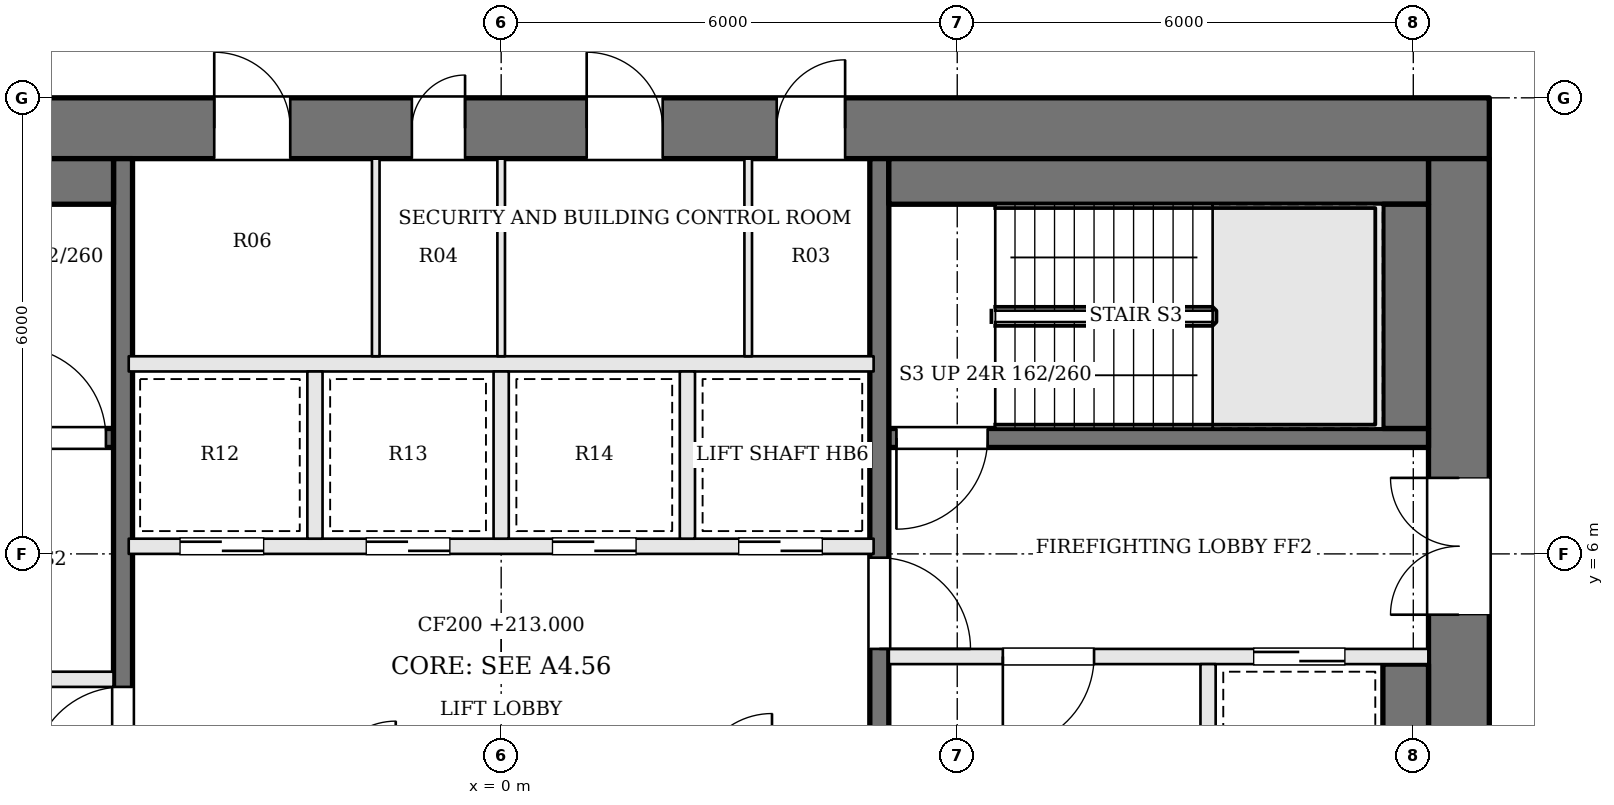
"""IFC4 building model, lengths in metres.
Left out: names, types, materials, properties, quantities, classifications, styles, units other than length and angle.
Written with IfcOpenShell. Run it as: python <this file> out.ifc"""

import sys

from ifc_helpers import new_model, si_unit, direction, frame, frame_2d, origin, place, context, subcontext, project, spatial, rectangle, extrude, element, fill, save


model = new_model("IFC4")
c1 = context("Model", 3, precision=1e-05, world=origin(), true_north=direction((0.0, 1.0)))
c2 = subcontext(c1, "Body", "Model", "MODEL_VIEW")
j1 = project(units=[si_unit("LENGTHUNIT", "METRE"), si_unit("PLANEANGLEUNIT", "RADIAN")], contexts=[c1])
p1 = place(None, origin())
s1 = spatial("IfcSite", under=j1, at=p1, CompositionType="ELEMENT")
p2 = place(p1, origin())
s2 = spatial("IfcBuilding", under=s1, at=p2, CompositionType="ELEMENT")
p3 = place(p2, frame((0.0, 0.0, 213.0)))
s3 = spatial("IfcBuildingStorey", under=s2, at=p3, CompositionType="ELEMENT", Elevation=213.0)
p4 = place(p3, frame((-13.0, 11.6, 0.0), z_axis=(0.0, 0.0, 1.0), x_axis=(1.0, 0.0, 0.0)))
e1 = element("IfcWall", 1, at=p4, inside=s3, PredefinedType="SHEAR", context=c2, shape_type="SweptSolid", body=[
    extrude(rectangle(XDim=26.0, YDim=0.8, at=frame_2d((13.0, 0.0))), origin(), (0.0, 0.0, 1.0), 3.9),
])
p5 = place(p4, frame((9.225, 0.0, 0.0)))
e2 = element("IfcOpeningElement", 2, at=p5, cuts=e1, PredefinedType="OPENING", context=c2, shape_type="SweptSolid", body=[
    extrude(rectangle(XDim=1.0, YDim=2.1, at=frame_2d((0.5, 1.05))), frame((0.0, 0.41, 0.0), z_axis=(0.0, -1.0, 0.0), x_axis=(1.0, 0.0, 0.0)), (0.0, 0.0, 1.0), 0.82),
])
p6 = place(p4, frame((11.825, 0.0, 0.0)))
e3 = element("IfcOpeningElement", 3, at=p6, cuts=e1, PredefinedType="OPENING", context=c2, shape_type="SweptSolid", body=[
    extrude(rectangle(XDim=0.7, YDim=2.1, at=frame_2d((0.35, 1.05))), frame((0.0, 0.41, 0.0), z_axis=(0.0, -1.0, 0.0), x_axis=(1.0, 0.0, 0.0)), (0.0, 0.0, 1.0), 0.82),
])
p7 = place(p4, frame((14.125, 0.0, 0.0)))
e4 = element("IfcOpeningElement", 4, at=p7, cuts=e1, PredefinedType="OPENING", context=c2, shape_type="SweptSolid", body=[
    extrude(rectangle(XDim=1.0, YDim=2.1, at=frame_2d((0.5, 1.05))), frame((0.0, 0.41, 0.0), z_axis=(0.0, -1.0, 0.0), x_axis=(1.0, 0.0, 0.0)), (0.0, 0.0, 1.0), 0.82),
])
p8 = place(p4, frame((16.625, 0.0, 0.0)))
e5 = element("IfcOpeningElement", 5, at=p8, cuts=e1, PredefinedType="OPENING", context=c2, shape_type="SweptSolid", body=[
    extrude(rectangle(XDim=0.9, YDim=2.1, at=frame_2d((0.45, 1.05))), frame((0.0, 0.41, 0.0), z_axis=(0.0, -1.0, 0.0), x_axis=(1.0, 0.0, 0.0)), (0.0, 0.0, 1.0), 0.82),
])
p9 = place(p3, frame((12.6, -2.2, 0.0), z_axis=(0.0, 0.0, 1.0), x_axis=(0.0, 1.0, 0.0)))
e6 = element("IfcWall", 6, at=p9, inside=s3, PredefinedType="SHEAR", context=c2, shape_type="SweptSolid", body=[
    extrude(rectangle(XDim=13.4, YDim=0.8, at=frame_2d((6.7, 0.0))), origin(), (0.0, 0.0, 1.0), 3.9),
])
p10 = place(p9, frame((7.4, 0.0, 0.0)))
e7 = element("IfcOpeningElement", 7, at=p10, cuts=e6, PredefinedType="OPENING", context=c2, shape_type="SweptSolid", body=[
    extrude(rectangle(XDim=1.8, YDim=2.1, at=frame_2d((0.9, 1.05))), frame((0.0, 0.41, 0.0), z_axis=(0.0, -1.0, 0.0), x_axis=(1.0, 0.0, 0.0)), (0.0, 0.0, 1.0), 0.82),
])
p11 = place(p3, frame((12.2, 7.525, 0.0), z_axis=(0.0, 0.0, 1.0), x_axis=(-1.0, 0.0, 0.0)))
e8 = element("IfcWall", 8, at=p11, inside=s3, PredefinedType="SOLIDWALL", context=c2, shape_type="SweptSolid", body=[
    extrude(rectangle(XDim=7.1, YDim=0.25, at=frame_2d((3.55, 0.0))), origin(), (0.0, 0.0, 1.0), 3.6),
])
p12 = place(p11, frame((5.8, 0.0, 0.0)))
e9 = element("IfcOpeningElement", 9, at=p12, cuts=e8, PredefinedType="OPENING", context=c2, shape_type="SweptSolid", body=[
    extrude(rectangle(XDim=1.2, YDim=2.1, at=frame_2d((0.6, 1.05))), frame((0.0, 0.135, 0.0), z_axis=(0.0, -1.0, 0.0), x_axis=(1.0, 0.0, 0.0)), (0.0, 0.0, 1.0), 0.27),
])
p13 = place(p3, frame((-12.2, 4.35, 0.0), z_axis=(0.0, 0.0, 1.0), x_axis=(1.0, 0.0, 0.0)))
e10 = element("IfcWall", 10, at=p13, inside=s3, PredefinedType="SOLIDWALL", context=c2, shape_type="SweptSolid", body=[
    extrude(rectangle(XDim=7.1, YDim=0.2, at=frame_2d((3.55, 0.0))), origin(), (0.0, 0.0, 1.0), 3.6),
])
p14 = place(p13, frame((4.4, 0.0, 0.0)))
e11 = element("IfcOpeningElement", 11, at=p14, cuts=e10, PredefinedType="OPENING", context=c2, shape_type="SweptSolid", body=[
    extrude(rectangle(XDim=1.2, YDim=2.1, at=frame_2d((0.6, 1.05))), frame((0.0, 0.11, 0.0), z_axis=(0.0, -1.0, 0.0), x_axis=(1.0, 0.0, 0.0)), (0.0, 0.0, 1.0), 0.22),
])
p15 = place(p13, frame((1.1, 0.0, 0.0)))
e12 = element("IfcOpeningElement", 12, at=p15, cuts=e10, PredefinedType="OPENING", context=c2, shape_type="SweptSolid", body=[
    extrude(rectangle(XDim=1.2, YDim=2.1, at=frame_2d((0.6, 1.05))), frame((0.0, 0.11, 0.0), z_axis=(0.0, -1.0, 0.0), x_axis=(1.0, 0.0, 0.0)), (0.0, 0.0, 1.0), 0.22),
])
p16 = place(p3, frame((12.2, 4.65, 0.0), z_axis=(0.0, 0.0, 1.0), x_axis=(-1.0, 0.0, 0.0)))
e13 = element("IfcWall", 13, at=p16, inside=s3, PredefinedType="SOLIDWALL", context=c2, shape_type="SweptSolid", body=[
    extrude(rectangle(XDim=7.1, YDim=0.2, at=frame_2d((3.55, 0.0))), origin(), (0.0, 0.0, 1.0), 3.6),
])
p17 = place(p16, frame((4.4, 0.0, 0.0)))
e14 = element("IfcOpeningElement", 14, at=p17, cuts=e13, PredefinedType="OPENING", context=c2, shape_type="SweptSolid", body=[
    extrude(rectangle(XDim=1.2, YDim=2.1, at=frame_2d((0.6, 1.05))), frame((0.0, 0.11, 0.0), z_axis=(0.0, -1.0, 0.0), x_axis=(1.0, 0.0, 0.0)), (0.0, 0.0, 1.0), 0.22),
])
p18 = place(p16, frame((1.1, 0.0, 0.0)))
e15 = element("IfcOpeningElement", 15, at=p18, cuts=e13, PredefinedType="OPENING", context=c2, shape_type="SweptSolid", body=[
    extrude(rectangle(XDim=1.2, YDim=2.1, at=frame_2d((0.6, 1.05))), frame((0.0, 0.11, 0.0), z_axis=(0.0, -1.0, 0.0), x_axis=(1.0, 0.0, 0.0)), (0.0, 0.0, 1.0), 0.22),
])
p19 = place(p3, frame((-12.2, 7.525, 0.0), z_axis=(0.0, 0.0, 1.0), x_axis=(1.0, 0.0, 0.0)))
e16 = element("IfcWall", 16, at=p19, inside=s3, PredefinedType="SOLIDWALL", context=c2, shape_type="SweptSolid", body=[
    extrude(rectangle(XDim=7.1, YDim=0.25, at=frame_2d((3.55, 0.0))), origin(), (0.0, 0.0, 1.0), 3.6),
])
p20 = place(p19, frame((5.8, 0.0, 0.0)))
e17 = element("IfcOpeningElement", 17, at=p20, cuts=e16, PredefinedType="OPENING", context=c2, shape_type="SweptSolid", body=[
    extrude(rectangle(XDim=1.2, YDim=2.1, at=frame_2d((0.6, 1.05))), frame((0.0, 0.135, 0.0), z_axis=(0.0, -1.0, 0.0), x_axis=(1.0, 0.0, 0.0)), (0.0, 0.0, 1.0), 0.27),
])
p21 = place(p3, frame((9.3, 4.55, 0.0), z_axis=(0.0, 0.0, 1.0), x_axis=(0.0, -1.0, 0.0)))
e18 = element("IfcWall", 18, at=p21, inside=s3, PredefinedType="SOLIDWALL", context=c2, shape_type="SweptSolid", body=[
    extrude(rectangle(XDim=3.0, YDim=0.2, at=frame_2d((1.5, 0.0))), origin(), (0.0, 0.0, 1.0), 3.6),
])
p22 = place(p3, frame((-4.975, -2.2, 0.0), z_axis=(0.0, 0.0, 1.0), x_axis=(0.0, 1.0, 0.0)))
e19 = element("IfcWall", 19, at=p22, inside=s3, PredefinedType="SOLIDWALL", context=c2, shape_type="SweptSolid", body=[
    extrude(rectangle(XDim=13.4, YDim=0.25, at=frame_2d((6.7, 0.0))), origin(), (0.0, 0.0, 1.0), 3.6),
])
p23 = place(p22, frame((5.25, 0.0, 0.0)))
e20 = element("IfcOpeningElement", 20, at=p23, cuts=e19, PredefinedType="OPENING", context=c2, shape_type="SweptSolid", body=[
    extrude(rectangle(XDim=1.2, YDim=2.1, at=frame_2d((0.6, 1.05))), frame((0.0, 0.135, 0.0), z_axis=(0.0, -1.0, 0.0), x_axis=(1.0, 0.0, 0.0)), (0.0, 0.0, 1.0), 0.27),
])
p24 = place(p3, frame((4.975, 11.2, 0.0), z_axis=(0.0, 0.0, 1.0), x_axis=(0.0, -1.0, 0.0)))
e21 = element("IfcWall", 21, at=p24, inside=s3, PredefinedType="SOLIDWALL", context=c2, shape_type="SweptSolid", body=[
    extrude(rectangle(XDim=13.4, YDim=0.25, at=frame_2d((6.7, 0.0))), origin(), (0.0, 0.0, 1.0), 3.6),
])
p25 = place(p24, frame((5.25, 0.0, 0.0)))
e22 = element("IfcOpeningElement", 22, at=p25, cuts=e21, PredefinedType="OPENING", context=c2, shape_type="SweptSolid", body=[
    extrude(rectangle(XDim=1.2, YDim=2.1, at=frame_2d((0.6, 1.05))), frame((0.0, 0.135, 0.0), z_axis=(0.0, -1.0, 0.0), x_axis=(1.0, 0.0, 0.0)), (0.0, 0.0, 1.0), 0.27),
])
for number, where, z_axis, x_axis in (
    (23, (-12.2, 10.9, 0.0), (0.0, 0.0, 1.0), (1.0, 0.0, 0.0)),
    (24, (12.2, 10.9, 0.0), (0.0, 0.0, 1.0), (-1.0, 0.0, 0.0)),
):
    element("IfcWall", number, at=place(p3, frame(where, z_axis=z_axis, x_axis=x_axis)), inside=s3, PredefinedType="SOLIDWALL", context=c2, shape_type="SweptSolid", body=[
        extrude(rectangle(XDim=7.1, YDim=0.6, at=frame_2d((3.55, 0.0))), origin(), (0.0, 0.0, 1.0), 3.6),
    ])
p26 = place(p3, frame((11.9, 10.6, 0.0), z_axis=(0.0, 0.0, 1.0), x_axis=(0.0, -1.0, 0.0)))
e25 = element("IfcWall", 25, at=p26, inside=s3, PredefinedType="SOLIDWALL", context=c2, shape_type="SweptSolid", body=[
    extrude(rectangle(XDim=2.95, YDim=0.6, at=frame_2d((1.475, 0.0))), origin(), (0.0, 0.0, 1.0), 3.6),
])
p27 = place(p3, frame((11.9, 4.55, 0.0), z_axis=(0.0, 0.0, 1.0), x_axis=(0.0, -1.0, 0.0)))
e26 = element("IfcWall", 26, at=p27, inside=s3, PredefinedType="SOLIDWALL", context=c2, shape_type="SweptSolid", body=[
    extrude(rectangle(XDim=3.0, YDim=0.6, at=frame_2d((1.5, 0.0))), origin(), (0.0, 0.0, 1.0), 3.6),
])
p28 = place(p3, frame((-4.9, 6.1, 0.0), z_axis=(0.0, 0.0, 1.0), x_axis=(1.0, 0.0, 0.0)))
e27 = element("IfcWall", 27, at=p28, inside=s3, PredefinedType="SOLIDWALL", context=c2, shape_type="SweptSolid", body=[
    extrude(rectangle(XDim=9.8, YDim=0.2, at=frame_2d((4.9, 0.0))), origin(), (0.0, 0.0, 1.0), 3.6),
])
p29 = place(p28, frame((0.675, 0.0, 0.0)))
e28 = element("IfcOpeningElement", 28, at=p29, cuts=e27, PredefinedType="OPENING", context=c2, shape_type="SweptSolid", body=[
    extrude(rectangle(XDim=1.1, YDim=2.1, at=frame_2d((0.55, 1.05))), frame((0.0, 0.11, 0.0), z_axis=(0.0, -1.0, 0.0), x_axis=(1.0, 0.0, 0.0)), (0.0, 0.0, 1.0), 0.22),
])
p30 = place(p28, frame((3.125, 0.0, 0.0)))
e29 = element("IfcOpeningElement", 29, at=p30, cuts=e27, PredefinedType="OPENING", context=c2, shape_type="SweptSolid", body=[
    extrude(rectangle(XDim=1.1, YDim=2.1, at=frame_2d((0.55, 1.05))), frame((0.0, 0.11, 0.0), z_axis=(0.0, -1.0, 0.0), x_axis=(1.0, 0.0, 0.0)), (0.0, 0.0, 1.0), 0.22),
])
p31 = place(p28, frame((5.575, 0.0, 0.0)))
e30 = element("IfcOpeningElement", 30, at=p31, cuts=e27, PredefinedType="OPENING", context=c2, shape_type="SweptSolid", body=[
    extrude(rectangle(XDim=1.1, YDim=2.1, at=frame_2d((0.55, 1.05))), frame((0.0, 0.11, 0.0), z_axis=(0.0, -1.0, 0.0), x_axis=(1.0, 0.0, 0.0)), (0.0, 0.0, 1.0), 0.22),
])
p32 = place(p28, frame((8.025, 0.0, 0.0)))
e31 = element("IfcOpeningElement", 31, at=p32, cuts=e27, PredefinedType="OPENING", context=c2, shape_type="SweptSolid", body=[
    extrude(rectangle(XDim=1.1, YDim=2.1, at=frame_2d((0.55, 1.05))), frame((0.0, 0.11, 0.0), z_axis=(0.0, -1.0, 0.0), x_axis=(1.0, 0.0, 0.0)), (0.0, 0.0, 1.0), 0.22),
])
p33 = place(p3, frame((-4.9, 8.5, 0.0), z_axis=(0.0, 0.0, 1.0), x_axis=(1.0, 0.0, 0.0)))
e32 = element("IfcWall", 32, at=p33, inside=s3, PredefinedType="SOLIDWALL", context=c2, shape_type="SweptSolid", body=[
    extrude(rectangle(XDim=9.8, YDim=0.2, at=frame_2d((4.9, 0.0))), origin(), (0.0, 0.0, 1.0), 3.6),
])
for number, where, z_axis, x_axis in (
    (33, (-2.45, 6.2, 0.0), (0.0, 0.0, 1.0), (0.0, 1.0, 0.0)),
    (34, (0.0, 6.2, 0.0), (0.0, 0.0, 1.0), (0.0, 1.0, 0.0)),
    (35, (2.45, 6.2, 0.0), (0.0, 0.0, 1.0), (0.0, 1.0, 0.0)),
):
    element("IfcWall", number, at=place(p3, frame(where, z_axis=z_axis, x_axis=x_axis)), inside=s3, PredefinedType="SOLIDWALL", context=c2, shape_type="SweptSolid", body=[
        extrude(rectangle(XDim=2.2, YDim=0.2, at=frame_2d((1.1, 0.0))), origin(), (0.0, 0.0, 1.0), 3.6),
    ])
for number, where, z_axis, x_axis in (
    (36, (-1.65, 8.6, 0.0), (0.0, 0.0, 1.0), (0.0, 1.0, 0.0)),
    (37, (0.0, 8.6, 0.0), (0.0, 0.0, 1.0), (0.0, 1.0, 0.0)),
    (38, (3.25, 8.6, 0.0), (0.0, 0.0, 1.0), (0.0, 1.0, 0.0)),
):
    element("IfcWall", number, at=place(p3, frame(where, z_axis=z_axis, x_axis=x_axis)), inside=s3, PredefinedType="PARTITIONING", context=c2, shape_type="SweptSolid", body=[
        extrude(rectangle(XDim=2.6, YDim=0.1, at=frame_2d((1.3, 0.0))), origin(), (0.0, 0.0, 1.0), 3.6),
    ])
p34 = place(p10, origin())
e39 = element("IfcDoor", 39, at=p34, inside=s3, OperationType="DOUBLE_DOOR_SINGLE_SWING", PredefinedType="DOOR", context=c2, shape_type="SweptSolid", body=[
    extrude(rectangle(XDim=1.8, YDim=2.1, at=frame_2d((0.9, 1.05))), frame((0.0, 0.025, 0.0), z_axis=(0.0, -1.0, 0.0), x_axis=(1.0, 0.0, 0.0)), (0.0, 0.0, 1.0), 0.05),
])
fill(e7, e39)
p35 = place(p23, origin())
e40 = element("IfcDoor", 40, at=p35, inside=s3, OperationType="SINGLE_SWING_LEFT", PredefinedType="DOOR", context=c2, shape_type="SweptSolid", body=[
    extrude(rectangle(XDim=1.2, YDim=2.1, at=frame_2d((0.6, 1.05))), frame((0.0, 0.025, 0.0), z_axis=(0.0, -1.0, 0.0), x_axis=(1.0, 0.0, 0.0)), (0.0, 0.0, 1.0), 0.05),
])
fill(e20, e40)
p36 = place(p25, origin())
e41 = element("IfcDoor", 41, at=p36, inside=s3, OperationType="SINGLE_SWING_RIGHT", PredefinedType="DOOR", context=c2, shape_type="SweptSolid", body=[
    extrude(rectangle(XDim=1.2, YDim=2.1, at=frame_2d((0.6, 1.05))), frame((0.0, 0.025, 0.0), z_axis=(0.0, -1.0, 0.0), x_axis=(1.0, 0.0, 0.0)), (0.0, 0.0, 1.0), 0.05),
])
fill(e22, e41)
p37 = place(p17, origin())
e42 = element("IfcDoor", 42, at=p37, inside=s3, OperationType="SINGLE_SWING_RIGHT", PredefinedType="DOOR", context=c2, shape_type="SweptSolid", body=[
    extrude(rectangle(XDim=1.2, YDim=2.1, at=frame_2d((0.6, 1.05))), frame((0.0, 0.025, 0.0), z_axis=(0.0, -1.0, 0.0), x_axis=(1.0, 0.0, 0.0)), (0.0, 0.0, 1.0), 0.05),
])
fill(e14, e42)
p38 = place(p12, origin())
e43 = element("IfcDoor", 43, at=p38, inside=s3, OperationType="SINGLE_SWING_RIGHT", PredefinedType="DOOR", context=c2, shape_type="SweptSolid", body=[
    extrude(rectangle(XDim=1.2, YDim=2.1, at=frame_2d((0.6, 1.05))), frame((0.0, 0.025, 0.0), z_axis=(0.0, -1.0, 0.0), x_axis=(1.0, 0.0, 0.0)), (0.0, 0.0, 1.0), 0.05),
])
fill(e9, e43)
p39 = place(p20, origin())
e44 = element("IfcDoor", 44, at=p39, inside=s3, OperationType="SINGLE_SWING_LEFT", PredefinedType="DOOR", context=c2, shape_type="SweptSolid", body=[
    extrude(rectangle(XDim=1.2, YDim=2.1, at=frame_2d((0.6, 1.05))), frame((0.0, 0.025, 0.0), z_axis=(0.0, -1.0, 0.0), x_axis=(1.0, 0.0, 0.0)), (0.0, 0.0, 1.0), 0.05),
])
fill(e17, e44)
p40 = place(p18, origin())
e45 = element("IfcDoor", 45, at=p40, inside=s3, OperationType="SLIDING_TO_RIGHT", PredefinedType="DOOR", context=c2, shape_type="SweptSolid", body=[
    extrude(rectangle(XDim=1.2, YDim=2.1, at=frame_2d((0.6, 1.05))), frame((0.0, 0.025, 0.0), z_axis=(0.0, -1.0, 0.0), x_axis=(1.0, 0.0, 0.0)), (0.0, 0.0, 1.0), 0.05),
])
fill(e15, e45)
p41 = place(p29, origin())
e46 = element("IfcDoor", 46, at=p41, inside=s3, OperationType="SLIDING_TO_RIGHT", PredefinedType="DOOR", context=c2, shape_type="SweptSolid", body=[
    extrude(rectangle(XDim=1.1, YDim=2.1, at=frame_2d((0.55, 1.05))), frame((0.0, 0.025, 0.0), z_axis=(0.0, -1.0, 0.0), x_axis=(1.0, 0.0, 0.0)), (0.0, 0.0, 1.0), 0.05),
])
fill(e28, e46)
p42 = place(p30, origin())
e47 = element("IfcDoor", 47, at=p42, inside=s3, OperationType="SLIDING_TO_LEFT", PredefinedType="DOOR", context=c2, shape_type="SweptSolid", body=[
    extrude(rectangle(XDim=1.1, YDim=2.1, at=frame_2d((0.55, 1.05))), frame((0.0, 0.025, 0.0), z_axis=(0.0, -1.0, 0.0), x_axis=(1.0, 0.0, 0.0)), (0.0, 0.0, 1.0), 0.05),
])
fill(e29, e47)
p43 = place(p31, origin())
e48 = element("IfcDoor", 48, at=p43, inside=s3, OperationType="SLIDING_TO_RIGHT", PredefinedType="DOOR", context=c2, shape_type="SweptSolid", body=[
    extrude(rectangle(XDim=1.1, YDim=2.1, at=frame_2d((0.55, 1.05))), frame((0.0, 0.025, 0.0), z_axis=(0.0, -1.0, 0.0), x_axis=(1.0, 0.0, 0.0)), (0.0, 0.0, 1.0), 0.05),
])
fill(e30, e48)
p44 = place(p32, origin())
e49 = element("IfcDoor", 49, at=p44, inside=s3, OperationType="SLIDING_TO_LEFT", PredefinedType="DOOR", context=c2, shape_type="SweptSolid", body=[
    extrude(rectangle(XDim=1.1, YDim=2.1, at=frame_2d((0.55, 1.05))), frame((0.0, 0.025, 0.0), z_axis=(0.0, -1.0, 0.0), x_axis=(1.0, 0.0, 0.0)), (0.0, 0.0, 1.0), 0.05),
])
fill(e31, e49)
p45 = place(p5, origin())
e50 = element("IfcDoor", 50, at=p45, inside=s3, OperationType="SINGLE_SWING_LEFT", PredefinedType="DOOR", context=c2, shape_type="SweptSolid", body=[
    extrude(rectangle(XDim=1.0, YDim=2.1, at=frame_2d((0.5, 1.05))), frame((0.0, 0.025, 0.0), z_axis=(0.0, -1.0, 0.0), x_axis=(1.0, 0.0, 0.0)), (0.0, 0.0, 1.0), 0.05),
])
fill(e2, e50)
p46 = place(p6, origin())
e51 = element("IfcDoor", 51, at=p46, inside=s3, OperationType="SINGLE_SWING_RIGHT", PredefinedType="DOOR", context=c2, shape_type="SweptSolid", body=[
    extrude(rectangle(XDim=0.7, YDim=2.1, at=frame_2d((0.35, 1.05))), frame((0.0, 0.025, 0.0), z_axis=(0.0, -1.0, 0.0), x_axis=(1.0, 0.0, 0.0)), (0.0, 0.0, 1.0), 0.05),
])
fill(e3, e51)
p47 = place(p7, origin())
e52 = element("IfcDoor", 52, at=p47, inside=s3, OperationType="SINGLE_SWING_LEFT", PredefinedType="DOOR", context=c2, shape_type="SweptSolid", body=[
    extrude(rectangle(XDim=1.0, YDim=2.1, at=frame_2d((0.5, 1.05))), frame((0.0, 0.025, 0.0), z_axis=(0.0, -1.0, 0.0), x_axis=(1.0, 0.0, 0.0)), (0.0, 0.0, 1.0), 0.05),
])
fill(e4, e52)
p48 = place(p8, origin())
e53 = element("IfcDoor", 53, at=p48, inside=s3, OperationType="SINGLE_SWING_RIGHT", PredefinedType="DOOR", context=c2, shape_type="SweptSolid", body=[
    extrude(rectangle(XDim=0.9, YDim=2.1, at=frame_2d((0.45, 1.05))), frame((0.0, 0.025, 0.0), z_axis=(0.0, -1.0, 0.0), x_axis=(1.0, 0.0, 0.0)), (0.0, 0.0, 1.0), 0.05),
])
fill(e5, e53)
save(model, sys.argv[1])
